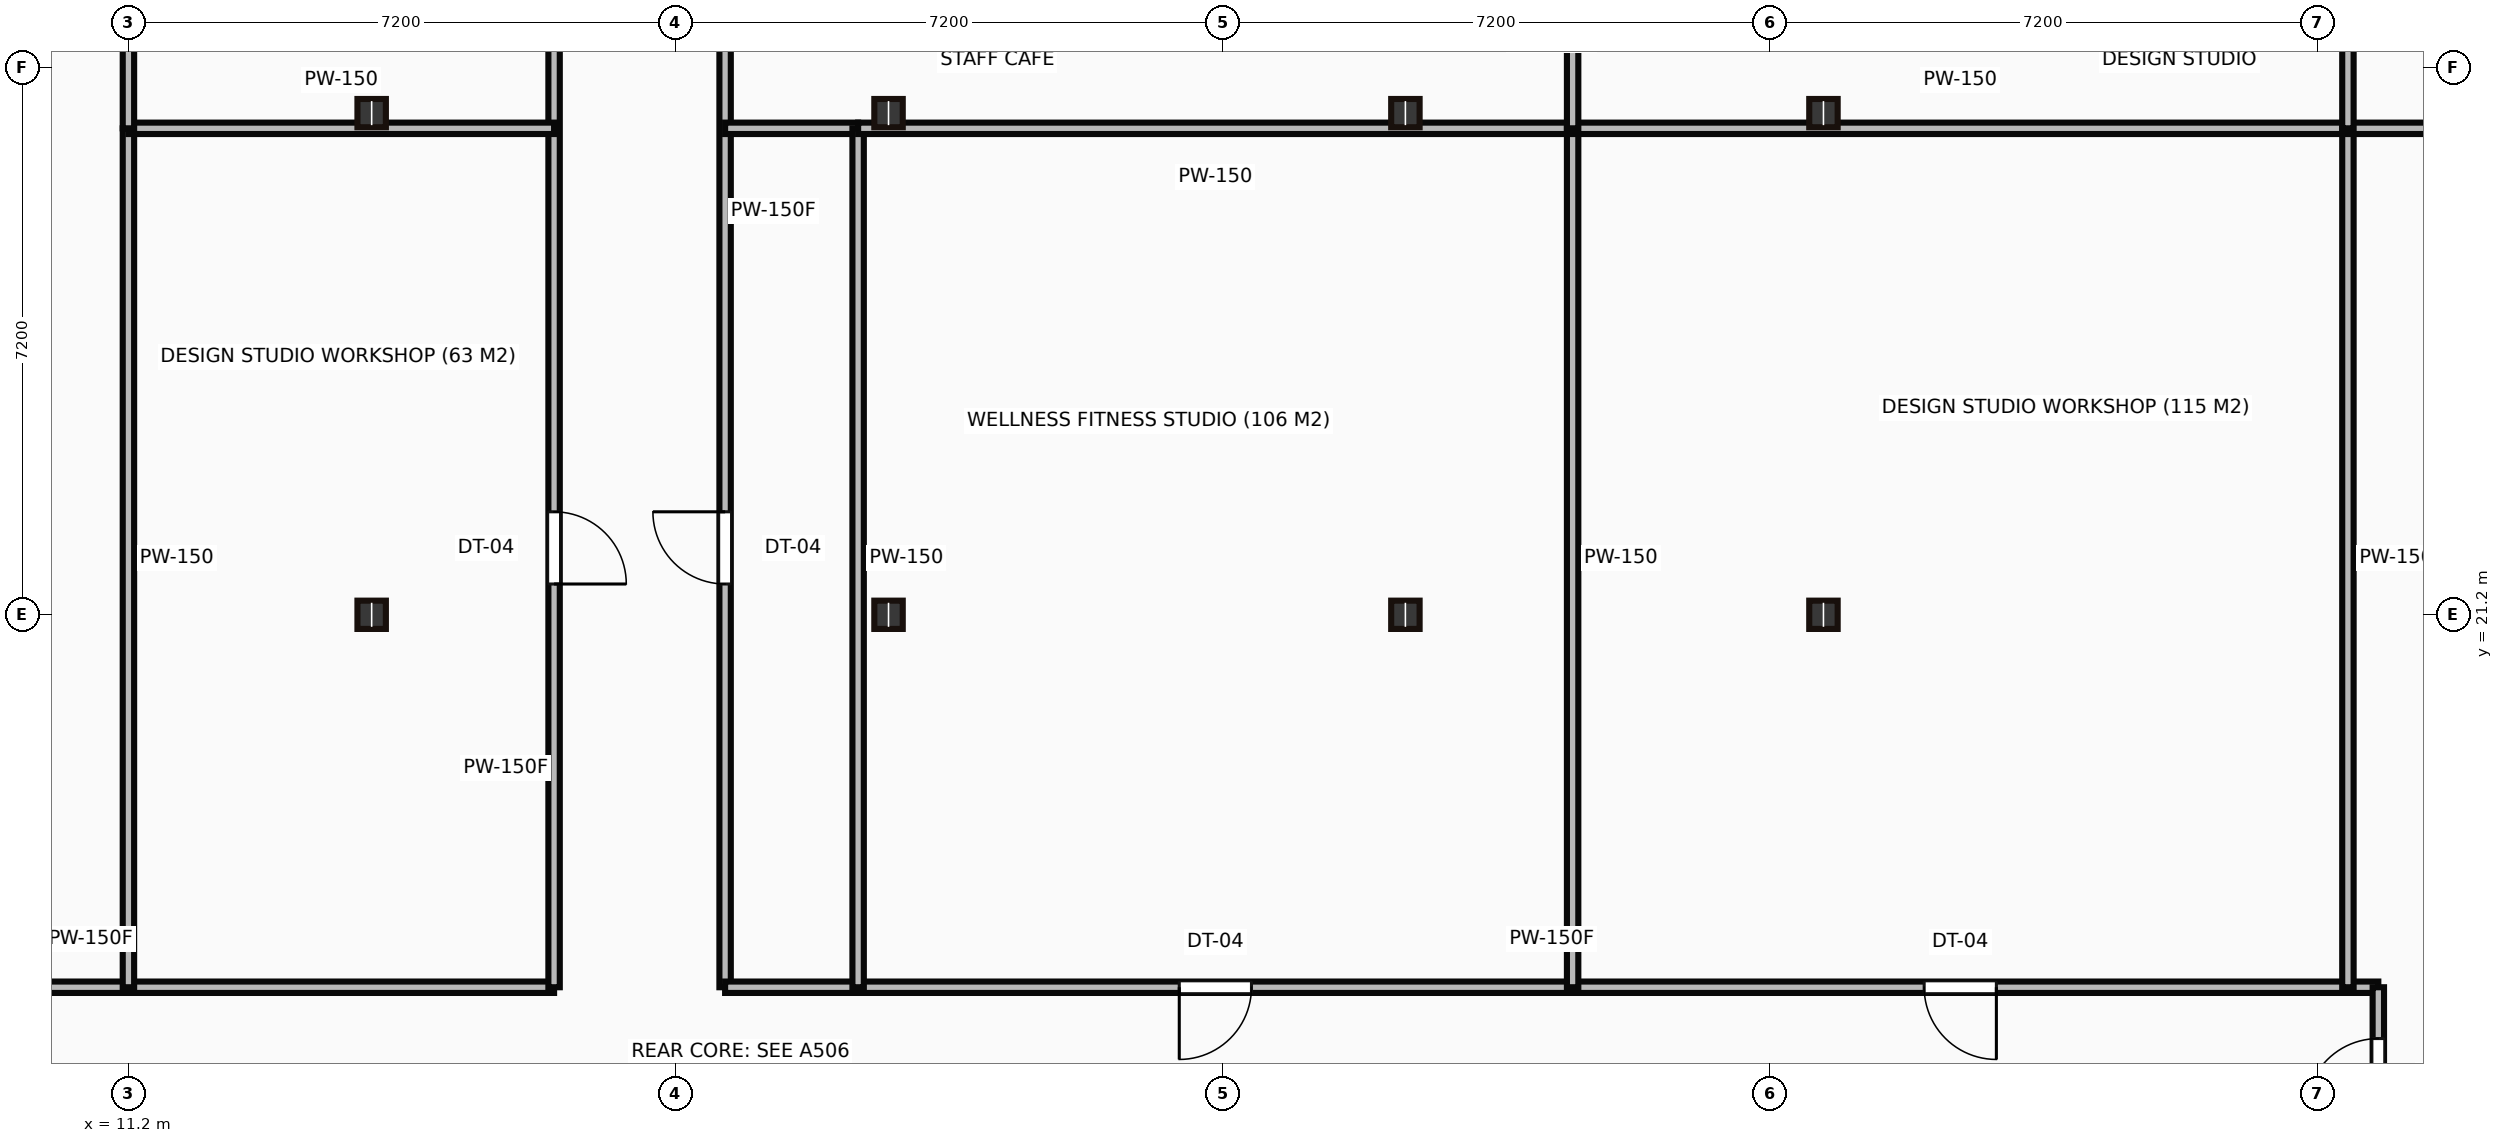
"""IFC4 building model, lengths in metres.
Left out: names, types, materials, properties, quantities, classifications, styles, units other than length and angle.
Written with IfcOpenShell. Run it as: python <this file> out.ifc"""

import sys

from ifc_helpers import new_model, si_unit, direction, frame, frame_2d, origin, origin_2d, place, context, subcontext, project, spatial, rectangle, i_section, extrude, source, transform, mapped, element, fill, save


model = new_model("IFC4")
c1 = context("Model", 3, precision=1e-05, world=origin(), true_north=direction((0.0, 1.0)))
c2 = subcontext(c1, "Body", "Model", "MODEL_VIEW")
j1 = project(units=[si_unit("LENGTHUNIT", "METRE"), si_unit("PLANEANGLEUNIT", "RADIAN")], contexts=[c1])
p1 = place(None, origin())
s1 = spatial("IfcSite", under=j1, at=p1, CompositionType="ELEMENT")
p2 = place(p1, origin())
s2 = spatial("IfcBuilding", under=s1, at=p2, CompositionType="ELEMENT")
p3 = place(p2, frame((0.0, 0.0, 144.25)))
s3 = spatial("IfcBuildingStorey", under=s2, at=p3, CompositionType="ELEMENT", Elevation=144.25)
m1 = source(origin(), c2, "Body", "SweptSolid", [
    extrude(i_section(OverallWidth=0.374, OverallDepth=0.372, WebThickness=0.016, FlangeThickness=0.026, at=origin_2d()), origin(), (0.0, 0.0, 1.0), 3.65),
])
for number, where, z_axis, x_axis in (
    (1, (14.4, 21.2, 0.0), (0.0, 0.0, 1.0), (1.0, 0.0, 0.0)),
    (2, (14.4, 27.8, 0.0), (0.0, 0.0, 1.0), (1.0, 0.0, 0.0)),
    (3, (21.2, 21.2, 0.0), (0.0, 0.0, 1.0), (1.0, 0.0, 0.0)),
    (4, (21.2, 27.8, 0.0), (0.0, 0.0, 1.0), (1.0, 0.0, 0.0)),
    (5, (28.0, 21.2, 0.0), (0.0, 0.0, 1.0), (1.0, 0.0, 0.0)),
    (6, (28.0, 27.8, 0.0), (0.0, 0.0, 1.0), (1.0, 0.0, 0.0)),
    (7, (33.5, 21.2, 0.0), (0.0, 0.0, 1.0), (1.0, 0.0, 0.0)),
    (8, (33.5, 27.8, 0.0), (0.0, 0.0, 1.0), (1.0, 0.0, 0.0)),
):
    element("IfcColumn", number, at=place(p3, frame(where, z_axis=z_axis, x_axis=x_axis)), inside=s3, PredefinedType="COLUMN", context=c2, shape_type="MappedRepresentation", body=[
        mapped(m1, transform((0.0, 0.0, 0.0))),
    ])
m2 = source(origin(), c2, "Body", "SweptSolid", [
    extrude(rectangle(XDim=12.2, YDim=0.15, at=frame_2d((6.1, 0.0))), origin(), (0.0, 0.0, 1.0), 3.4),
])
p4 = place(p3, frame((4.6, 16.3, 0.0), z_axis=(0.0, 0.0, 1.0), x_axis=(1.0, 0.0, 0.0)))
e9 = element("IfcWall", 9, at=p4, inside=s3, PredefinedType="PARTITIONING", context=c2, shape_type="MappedRepresentation", body=[
    mapped(m2, transform((0.0, 0.0, 0.0))),
])
p5 = place(p4, frame((2.955, 0.0, 0.0)))
e10 = element("IfcOpeningElement", 10, at=p5, cuts=e9, PredefinedType="OPENING", context=c2, shape_type="SweptSolid", body=[
    extrude(rectangle(XDim=0.95, YDim=2.15, at=frame_2d((0.475, 1.075))), frame((0.0, 0.085, 0.0), z_axis=(0.0, -1.0, 0.0), x_axis=(1.0, 0.0, 0.0)), (0.0, 0.0, 1.0), 0.17),
])
m3 = source(origin(), c2, "Body", "SweptSolid", [
    extrude(rectangle(XDim=13.1, YDim=0.15, at=frame_2d((6.55, 0.0))), origin(), (0.0, 0.0, 1.0), 3.4),
])
p6 = place(p3, frame((16.8, 16.3, 0.0), z_axis=(0.0, 0.0, 1.0), x_axis=(0.0, 1.0, 0.0)))
e11 = element("IfcWall", 11, at=p6, inside=s3, PredefinedType="PARTITIONING", context=c2, shape_type="MappedRepresentation", body=[
    mapped(m3, transform((0.0, 0.0, 0.0))),
])
p7 = place(p6, frame((5.305, 0.0, 0.0)))
e12 = element("IfcOpeningElement", 12, at=p7, cuts=e11, PredefinedType="OPENING", context=c2, shape_type="SweptSolid", body=[
    extrude(rectangle(XDim=0.95, YDim=2.15, at=frame_2d((0.475, 1.075))), frame((0.0, 0.085, 0.0), z_axis=(0.0, -1.0, 0.0), x_axis=(1.0, 0.0, 0.0)), (0.0, 0.0, 1.0), 0.17),
])
p8 = place(p3, frame((19.05, 29.4, 0.0), z_axis=(0.0, 0.0, 1.0), x_axis=(0.0, -1.0, 0.0)))
e13 = element("IfcWall", 13, at=p8, inside=s3, PredefinedType="PARTITIONING", context=c2, shape_type="MappedRepresentation", body=[
    mapped(m3, transform((0.0, 0.0, 0.0))),
])
p9 = place(p8, frame((6.845, 0.0, 0.0)))
e14 = element("IfcOpeningElement", 14, at=p9, cuts=e13, PredefinedType="OPENING", context=c2, shape_type="SweptSolid", body=[
    extrude(rectangle(XDim=0.95, YDim=2.15, at=frame_2d((0.475, 1.075))), frame((0.0, 0.085, 0.0), z_axis=(0.0, -1.0, 0.0), x_axis=(1.0, 0.0, 0.0)), (0.0, 0.0, 1.0), 0.17),
])
m4 = source(origin(), c2, "Body", "SweptSolid", [
    extrude(rectangle(XDim=21.75, YDim=0.15, at=frame_2d((10.875, 0.0))), origin(), (0.0, 0.0, 1.0), 3.4),
])
p10 = place(p3, frame((19.05, 16.3, 0.0), z_axis=(0.0, 0.0, 1.0), x_axis=(1.0, 0.0, 0.0)))
e15 = element("IfcWall", 15, at=p10, inside=s3, PredefinedType="PARTITIONING", context=c2, shape_type="MappedRepresentation", body=[
    mapped(m4, transform((0.0, 0.0, 0.0))),
])
p11 = place(p10, frame((5.975, 0.0, 0.0)))
e16 = element("IfcOpeningElement", 16, at=p11, cuts=e15, PredefinedType="OPENING", context=c2, shape_type="SweptSolid", body=[
    extrude(rectangle(XDim=0.95, YDim=2.15, at=frame_2d((0.475, 1.075))), frame((0.0, 0.085, 0.0), z_axis=(0.0, -1.0, 0.0), x_axis=(1.0, 0.0, 0.0)), (0.0, 0.0, 1.0), 0.17),
])
p12 = place(p10, frame((15.775, 0.0, 0.0)))
e17 = element("IfcOpeningElement", 17, at=p12, cuts=e15, PredefinedType="OPENING", context=c2, shape_type="SweptSolid", body=[
    extrude(rectangle(XDim=0.95, YDim=2.15, at=frame_2d((0.475, 1.075))), frame((0.0, 0.085, 0.0), z_axis=(0.0, -1.0, 0.0), x_axis=(1.0, 0.0, 0.0)), (0.0, 0.0, 1.0), 0.17),
])
m5 = source(origin(), c2, "Body", "SweptSolid", [
    extrude(rectangle(XDim=2.3, YDim=0.15, at=frame_2d((1.15, 0.0))), origin(), (0.0, 0.0, 1.0), 3.4),
])
p13 = place(p3, frame((40.8, 16.3, 0.0), z_axis=(0.0, 0.0, 1.0), x_axis=(0.0, -1.0, 0.0)))
e18 = element("IfcWall", 18, at=p13, inside=s3, PredefinedType="PARTITIONING", context=c2, shape_type="MappedRepresentation", body=[
    mapped(m5, transform((0.0, 0.0, 0.0))),
])
p14 = place(p13, frame((0.675, 0.0, 0.0)))
e19 = element("IfcOpeningElement", 19, at=p14, cuts=e18, PredefinedType="OPENING", context=c2, shape_type="SweptSolid", body=[
    extrude(rectangle(XDim=0.95, YDim=2.15, at=frame_2d((0.475, 1.075))), frame((0.0, 0.085, 0.0), z_axis=(0.0, -1.0, 0.0), x_axis=(1.0, 0.0, 0.0)), (0.0, 0.0, 1.0), 0.17),
])
m6 = source(origin(), c2, "Body", "SweptSolid", [
    extrude(rectangle(XDim=11.3, YDim=0.15, at=frame_2d((5.65, 0.0))), origin(), (0.0, 0.0, 1.0), 3.4),
])
p15 = place(p3, frame((11.2, 27.6, 0.0), z_axis=(0.0, 0.0, 1.0), x_axis=(0.0, -1.0, 0.0)))
e20 = element("IfcWall", 20, at=p15, inside=s3, PredefinedType="PARTITIONING", context=c2, shape_type="MappedRepresentation", body=[
    mapped(m6, transform((0.0, 0.0, 0.0))),
])
m7 = source(origin(), c2, "Body", "SweptSolid", [
    extrude(rectangle(XDim=5.6, YDim=0.15, at=frame_2d((2.8, 0.0))), origin(), (0.0, 0.0, 1.0), 3.4),
])
p16 = place(p3, frame((11.2, 27.6, 0.0), z_axis=(0.0, 0.0, 1.0), x_axis=(1.0, 0.0, 0.0)))
e21 = element("IfcWall", 21, at=p16, inside=s3, PredefinedType="PARTITIONING", context=c2, shape_type="MappedRepresentation", body=[
    mapped(m7, transform((0.0, 0.0, 0.0))),
])
m8 = source(origin(), c2, "Body", "SweptSolid", [
    extrude(rectangle(XDim=11.206, YDim=0.15, at=frame_2d((5.603, 0.0))), origin(), (0.0, 0.0, 1.0), 3.4),
])
p17 = place(p3, frame((11.2, 38.806, 0.0), z_axis=(0.0, 0.0, 1.0), x_axis=(0.0, -1.0, 0.0)))
e22 = element("IfcWall", 22, at=p17, inside=s3, PredefinedType="PARTITIONING", context=c2, shape_type="MappedRepresentation", body=[
    mapped(m8, transform((0.0, 0.0, 0.0))),
])
m9 = source(origin(), c2, "Body", "SweptSolid", [
    extrude(rectangle(XDim=1.75, YDim=0.15, at=frame_2d((0.875, 0.0))), origin(), (0.0, 0.0, 1.0), 3.4),
])
p18 = place(p3, frame((19.05, 27.6, 0.0), z_axis=(0.0, 0.0, 1.0), x_axis=(1.0, 0.0, 0.0)))
e23 = element("IfcWall", 23, at=p18, inside=s3, PredefinedType="PARTITIONING", context=c2, shape_type="MappedRepresentation", body=[
    mapped(m9, transform((0.0, 0.0, 0.0))),
])
p19 = place(p3, frame((20.8, 27.6, 0.0), z_axis=(0.0, 0.0, 1.0), x_axis=(0.0, -1.0, 0.0)))
e24 = element("IfcWall", 24, at=p19, inside=s3, PredefinedType="PARTITIONING", context=c2, shape_type="MappedRepresentation", body=[
    mapped(m6, transform((0.0, 0.0, 0.0))),
])
m10 = source(origin(), c2, "Body", "SweptSolid", [
    extrude(rectangle(XDim=9.4, YDim=0.15, at=frame_2d((4.7, 0.0))), origin(), (0.0, 0.0, 1.0), 3.4),
])
p20 = place(p3, frame((30.2, 27.6, 0.0), z_axis=(0.0, 0.0, 1.0), x_axis=(-1.0, 0.0, 0.0)))
e25 = element("IfcWall", 25, at=p20, inside=s3, PredefinedType="PARTITIONING", context=c2, shape_type="MappedRepresentation", body=[
    mapped(m10, transform((0.0, 0.0, 0.0))),
])
p21 = place(p3, frame((30.2, 27.6, 0.0), z_axis=(0.0, 0.0, 1.0), x_axis=(0.0, -1.0, 0.0)))
e26 = element("IfcWall", 26, at=p21, inside=s3, PredefinedType="PARTITIONING", context=c2, shape_type="MappedRepresentation", body=[
    mapped(m6, transform((0.0, 0.0, 0.0))),
])
m11 = source(origin(), c2, "Body", "SweptSolid", [
    extrude(rectangle(XDim=10.2, YDim=0.15, at=frame_2d((5.1, 0.0))), origin(), (0.0, 0.0, 1.0), 3.4),
])
p22 = place(p3, frame((30.2, 27.6, 0.0), z_axis=(0.0, 0.0, 1.0), x_axis=(1.0, 0.0, 0.0)))
e27 = element("IfcWall", 27, at=p22, inside=s3, PredefinedType="PARTITIONING", context=c2, shape_type="MappedRepresentation", body=[
    mapped(m11, transform((0.0, 0.0, 0.0))),
])
m12 = source(origin(), c2, "Body", "SweptSolid", [
    extrude(rectangle(XDim=1.8, YDim=0.15, at=frame_2d((0.9, 0.0))), origin(), (0.0, 0.0, 1.0), 3.4),
])
p23 = place(p3, frame((30.2, 29.4, 0.0), z_axis=(0.0, 0.0, 1.0), x_axis=(0.0, -1.0, 0.0)))
e28 = element("IfcWall", 28, at=p23, inside=s3, PredefinedType="PARTITIONING", context=c2, shape_type="MappedRepresentation", body=[
    mapped(m12, transform((0.0, 0.0, 0.0))),
])
p24 = place(p3, frame((40.4, 27.6, 0.0), z_axis=(0.0, 0.0, 1.0), x_axis=(0.0, -1.0, 0.0)))
e29 = element("IfcWall", 29, at=p24, inside=s3, PredefinedType="PARTITIONING", context=c2, shape_type="MappedRepresentation", body=[
    mapped(m6, transform((0.0, 0.0, 0.0))),
])
m13 = source(origin(), c2, "Body", "SweptSolid", [
    extrude(rectangle(XDim=9.58, YDim=0.15, at=frame_2d((4.79, 0.0))), origin(), (0.0, 0.0, 1.0), 3.4),
])
p25 = place(p3, frame((40.4, 27.6, 0.0), z_axis=(0.0, 0.0, 1.0), x_axis=(1.0, 0.0, 0.0)))
e30 = element("IfcWall", 30, at=p25, inside=s3, PredefinedType="PARTITIONING", context=c2, shape_type="MappedRepresentation", body=[
    mapped(m13, transform((0.0, 0.0, 0.0))),
])
p26 = place(p3, frame((40.4, 29.4, 0.0), z_axis=(0.0, 0.0, 1.0), x_axis=(0.0, -1.0, 0.0)))
e31 = element("IfcWall", 31, at=p26, inside=s3, PredefinedType="PARTITIONING", context=c2, shape_type="MappedRepresentation", body=[
    mapped(m12, transform((0.0, 0.0, 0.0))),
])
m14 = source(origin(), c2, "Body", "SweptSolid", [
    extrude(rectangle(XDim=0.95, YDim=2.15, at=frame_2d((0.475, 1.075))), frame((0.0, 0.025, 0.0), z_axis=(0.0, -1.0, 0.0), x_axis=(1.0, 0.0, 0.0)), (0.0, 0.0, 1.0), 0.05),
])
p27 = place(p7, origin())
e32 = element("IfcDoor", 32, at=p27, inside=s3, OperationType="SINGLE_SWING_LEFT", PredefinedType="DOOR", context=c2, shape_type="MappedRepresentation", body=[
    mapped(m14, transform((0.0, 0.0, 0.0))),
])
fill(e12, e32)
p28 = place(p9, origin())
e33 = element("IfcDoor", 33, at=p28, inside=s3, OperationType="SINGLE_SWING_LEFT", PredefinedType="DOOR", context=c2, shape_type="MappedRepresentation", body=[
    mapped(m14, transform((0.0, 0.0, 0.0))),
])
fill(e14, e33)
p29 = place(p11, origin())
e34 = element("IfcDoor", 34, at=p29, inside=s3, OperationType="SINGLE_SWING_LEFT", PredefinedType="DOOR", context=c2, shape_type="MappedRepresentation", body=[
    mapped(m14, transform((0.0, 0.0, 0.0))),
])
fill(e16, e34)
p30 = place(p12, origin())
e35 = element("IfcDoor", 35, at=p30, inside=s3, OperationType="SINGLE_SWING_RIGHT", PredefinedType="DOOR", context=c2, shape_type="MappedRepresentation", body=[
    mapped(m14, transform((0.0, 0.0, 0.0))),
])
fill(e17, e35)
p31 = place(p14, origin())
e36 = element("IfcDoor", 36, at=p31, inside=s3, OperationType="SINGLE_SWING_RIGHT", PredefinedType="DOOR", context=c2, shape_type="MappedRepresentation", body=[
    mapped(m14, transform((0.0, 0.0, 0.0))),
])
fill(e19, e36)
save(model, sys.argv[1])
